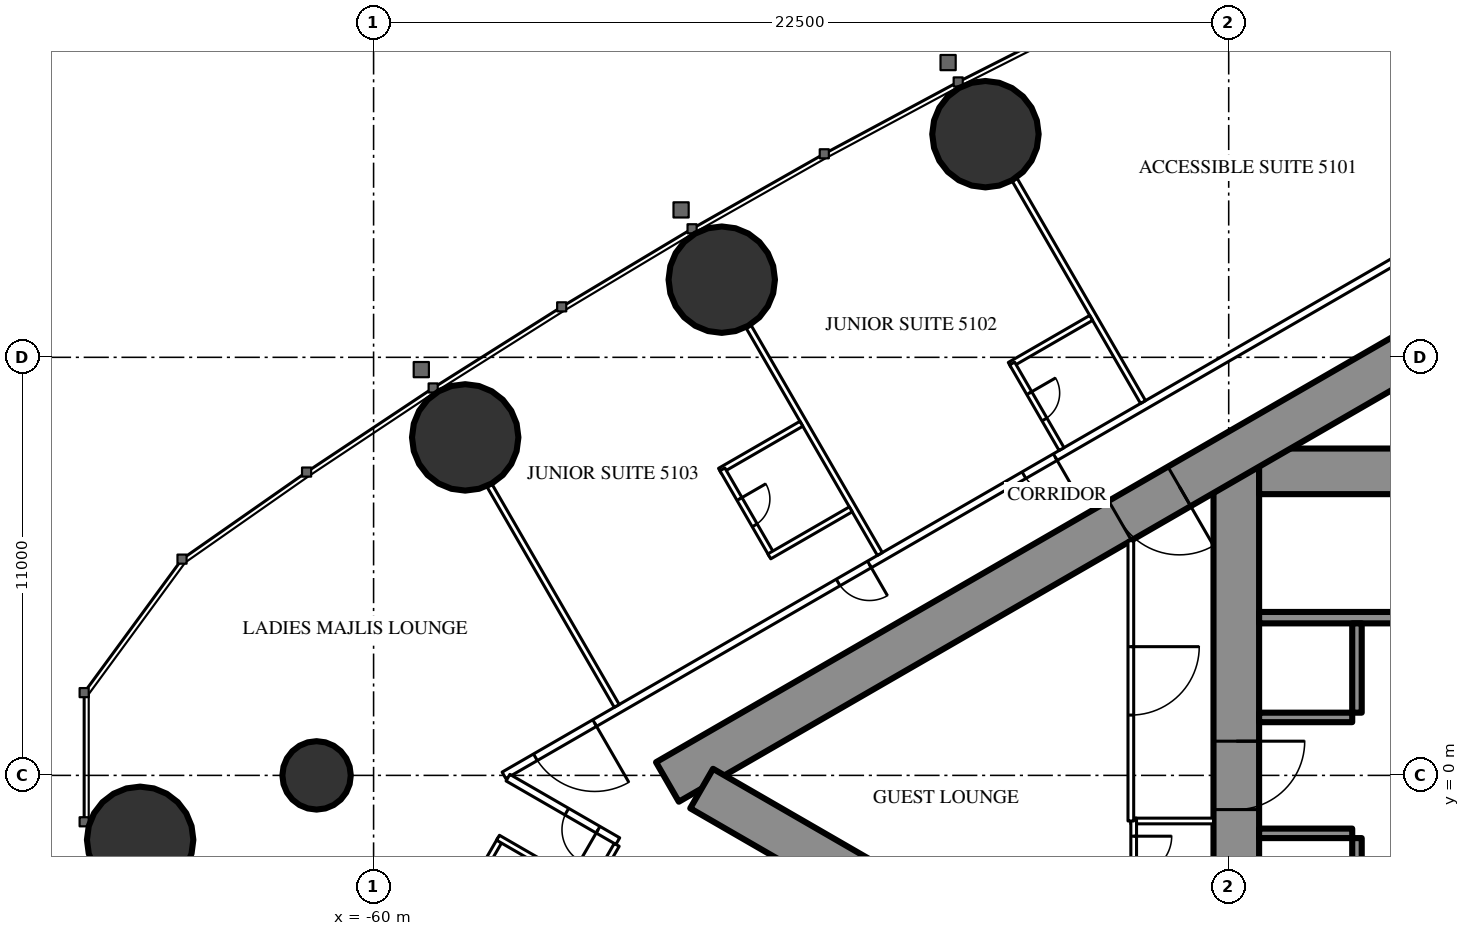
"""IFC4 building model, lengths in metres.
Left out: names, types, materials, properties, quantities, classifications, styles, units other than length and angle.
Written with IfcOpenShell. Run it as: python <this file> out.ifc"""

import sys

from ifc_helpers import new_model, si_unit, direction, frame, frame_2d, origin, origin_2d, place, context, subcontext, project, spatial, rectangle, circle, extrude, element, fill, save


model = new_model("IFC4")
c1 = context("Model", 3, precision=1e-05, world=origin(), true_north=direction((0.0, 1.0)))
c2 = subcontext(c1, "Body", "Model", "MODEL_VIEW")
j1 = project(units=[si_unit("LENGTHUNIT", "METRE"), si_unit("PLANEANGLEUNIT", "RADIAN")], contexts=[c1])
p1 = place(None, origin())
s1 = spatial("IfcSite", under=j1, at=p1, CompositionType="ELEMENT")
p2 = place(p1, origin())
s2 = spatial("IfcBuilding", under=s1, at=p2, CompositionType="ELEMENT")
p3 = place(p2, frame((0.0, 0.0, 191.3)))
s3 = spatial("IfcBuildingStorey", under=s2, at=p3, CompositionType="ELEMENT", Elevation=191.3)
for number, where, z_axis, x_axis in (
    (1, (-66.143, -1.695, 0.0), (0.0, 0.0, 1.0), (1.0, 0.0, 0.0)),
    (2, (-43.9, 16.871, 0.0), (0.0, 0.0, 1.0), (1.0, 0.0, 0.0)),
    (3, (-50.839, 13.043, 0.0), (0.0, 0.0, 1.0), (1.0, 0.0, 0.0)),
    (4, (-57.59, 8.893, 0.0), (0.0, 0.0, 1.0), (1.0, 0.0, 0.0)),
):
    element("IfcColumn", number, at=place(p3, frame(where, z_axis=z_axis, x_axis=x_axis)), inside=s3, PredefinedType="COLUMN", context=c2, shape_type="SweptSolid", body=[
        extrude(circle(Radius=1.4, at=origin_2d()), origin(), (0.0, 0.0, 1.0), 3.5),
    ])
p4 = place(p3, frame((-61.5, 0.0, 0.0), z_axis=(0.0, 0.0, 1.0), x_axis=(1.0, 0.0, 0.0)))
e5 = element("IfcColumn", 5, at=p4, inside=s3, PredefinedType="COLUMN", context=c2, shape_type="SweptSolid", body=[
    extrude(circle(Radius=0.9, at=origin_2d()), origin(), (0.0, 0.0, 1.0), 3.5),
])
p5 = place(p3, frame((-37.3, 8.6, 0.0), z_axis=(0.0, 0.0, 1.0), x_axis=(0.0, -1.0, 0.0)))
e6 = element("IfcWall", 6, at=p5, inside=s3, PredefinedType="SHEAR", context=c2, shape_type="SweptSolid", body=[
    extrude(rectangle(XDim=17.2, YDim=1.2, at=frame_2d((8.6, 0.0))), origin(), (0.0, 0.0, 1.0), 3.5),
])
p6 = place(p5, frame((7.7, 0.0, 0.0)))
e7 = element("IfcOpeningElement", 7, at=p6, cuts=e6, PredefinedType="OPENING", context=c2, shape_type="SweptSolid", body=[
    extrude(rectangle(XDim=1.8, YDim=2.2, at=frame_2d((0.9, 1.1))), frame((0.0, 0.61, 0.0), z_axis=(0.0, -1.0, 0.0), x_axis=(1.0, 0.0, 0.0)), (0.0, 0.0, 1.0), 1.22),
])
p7 = place(p3, frame((-28.3, 8.0, 0.0), z_axis=(0.0, 0.0, 1.0), x_axis=(-1.0, 0.0, 0.0)))
e8 = element("IfcWall", 8, at=p7, inside=s3, PredefinedType="SHEAR", context=c2, shape_type="SweptSolid", body=[
    extrude(rectangle(XDim=8.4, YDim=1.2, at=frame_2d((4.2, 0.0))), origin(), (0.0, 0.0, 1.0), 3.5),
])
p8 = place(p7, frame((0.25, 0.0, 0.0)))
e9 = element("IfcOpeningElement", 9, at=p8, cuts=e8, PredefinedType="OPENING", context=c2, shape_type="SweptSolid", body=[
    extrude(rectangle(XDim=1.0, YDim=2.2, at=frame_2d((0.5, 1.1))), frame((0.0, 0.61, 0.0), z_axis=(0.0, -1.0, 0.0), x_axis=(1.0, 0.0, 0.0)), (0.0, 0.0, 1.0), 1.22),
])
p9 = place(p3, frame((-28.3, 4.15, 0.0), z_axis=(0.0, 0.0, 1.0), x_axis=(-1.0, 0.0, 0.0)))
e10 = element("IfcWall", 10, at=p9, inside=s3, PredefinedType="SHEAR", context=c2, shape_type="SweptSolid", body=[
    extrude(rectangle(XDim=8.4, YDim=0.3, at=frame_2d((4.2, 0.0))), origin(), (0.0, 0.0, 1.0), 3.5),
])
p10 = place(p3, frame((-34.125, 4.0, 0.0), z_axis=(0.0, 0.0, 1.0), x_axis=(0.0, -1.0, 0.0)))
e11 = element("IfcWall", 11, at=p10, inside=s3, PredefinedType="SHEAR", context=c2, shape_type="SweptSolid", body=[
    extrude(rectangle(XDim=2.35, YDim=0.25, at=frame_2d((1.175, 0.0))), origin(), (0.0, 0.0, 1.0), 3.5),
])
p11 = place(p3, frame((-34.25, 1.525, 0.0), z_axis=(0.0, 0.0, 1.0), x_axis=(-1.0, 0.0, 0.0)))
e12 = element("IfcWall", 12, at=p11, inside=s3, PredefinedType="SHEAR", context=c2, shape_type="SweptSolid", body=[
    extrude(rectangle(XDim=2.45, YDim=0.25, at=frame_2d((1.225, 0.0))), origin(), (0.0, 0.0, 1.0), 3.5),
])
p12 = place(p3, frame((-34.125, -1.65, 0.0), z_axis=(0.0, 0.0, 1.0), x_axis=(0.0, -1.0, 0.0)))
e13 = element("IfcWall", 13, at=p12, inside=s3, PredefinedType="SHEAR", context=c2, shape_type="SweptSolid", body=[
    extrude(rectangle(XDim=2.35, YDim=0.25, at=frame_2d((1.175, 0.0))), origin(), (0.0, 0.0, 1.0), 3.5),
])
p13 = place(p3, frame((-34.25, -1.525, 0.0), z_axis=(0.0, 0.0, 1.0), x_axis=(-1.0, 0.0, 0.0)))
e14 = element("IfcWall", 14, at=p13, inside=s3, PredefinedType="SHEAR", context=c2, shape_type="SweptSolid", body=[
    extrude(rectangle(XDim=2.45, YDim=0.25, at=frame_2d((1.225, 0.0))), origin(), (0.0, 0.0, 1.0), 3.5),
])
p14 = place(p3, frame((-27.2, 14.3, 0.0), z_axis=(0.0, 0.0, 1.0), x_axis=(-0.866026593062, -0.499997940104, 0.0)))
e15 = element("IfcWall", 15, at=p14, inside=s3, PredefinedType="SHEAR", context=c2, shape_type="SweptSolid", body=[
    extrude(rectangle(XDim=28.946, YDim=1.2, at=frame_2d((14.473, 0.0))), origin(), (0.0, 0.0, 1.0), 3.5),
])
p15 = place(p14, frame((4.6, 0.0, 0.0)))
e16 = element("IfcOpeningElement", 16, at=p15, cuts=e15, PredefinedType="OPENING", context=c2, shape_type="SweptSolid", body=[
    extrude(rectangle(XDim=1.0, YDim=2.2, at=frame_2d((0.5, 1.1))), frame((0.0, 0.61, 0.0), z_axis=(0.0, -1.0, 0.0), x_axis=(1.0, 0.0, 0.0)), (0.0, 0.0, 1.0), 1.22),
])
p16 = place(p14, frame((13.395, 0.0, 0.0)))
e17 = element("IfcOpeningElement", 17, at=p16, cuts=e15, PredefinedType="OPENING", context=c2, shape_type="SweptSolid", body=[
    extrude(rectangle(XDim=1.8, YDim=2.2, at=frame_2d((0.9, 1.1))), frame((0.0, 0.61, 0.0), z_axis=(0.0, -1.0, 0.0), x_axis=(1.0, 0.0, 0.0)), (0.0, 0.0, 1.0), 1.22),
])
p17 = place(p3, frame((-27.2, -14.3, 0.0), z_axis=(0.0, 0.0, 1.0), x_axis=(-0.866024021859, 0.500002393557, 0.0)))
e18 = element("IfcWall", 18, at=p17, inside=s3, PredefinedType="SHEAR", context=c2, shape_type="SweptSolid", body=[
    extrude(rectangle(XDim=27.907, YDim=1.2, at=frame_2d((13.954, 0.0))), origin(), (0.0, 0.0, 1.0), 3.5),
])
p18 = place(p17, frame((4.6, 0.0, 0.0)))
e19 = element("IfcOpeningElement", 19, at=p18, cuts=e18, PredefinedType="OPENING", context=c2, shape_type="SweptSolid", body=[
    extrude(rectangle(XDim=1.0, YDim=2.2, at=frame_2d((0.5, 1.1))), frame((0.0, 0.61, 0.0), z_axis=(0.0, -1.0, 0.0), x_axis=(1.0, 0.0, 0.0)), (0.0, 0.0, 1.0), 1.22),
])
p19 = place(p17, frame((13.395, 0.0, 0.0)))
e20 = element("IfcOpeningElement", 20, at=p19, cuts=e18, PredefinedType="OPENING", context=c2, shape_type="SweptSolid", body=[
    extrude(rectangle(XDim=1.8, YDim=2.2, at=frame_2d((0.9, 1.1))), frame((0.0, 0.61, 0.0), z_axis=(0.0, -1.0, 0.0), x_axis=(1.0, 0.0, 0.0)), (0.0, 0.0, 1.0), 1.22),
])
p20 = place(p3, frame((-27.86, 16.575, 0.0), z_axis=(0.0, 0.0, 1.0), x_axis=(-0.866025533911, -0.499999774615, 0.0)))
e21 = element("IfcWall", 21, at=p20, inside=s3, PredefinedType="PARTITIONING", context=c2, shape_type="SweptSolid", body=[
    extrude(rectangle(XDim=33.149, YDim=0.2, at=frame_2d((16.575, 0.0))), origin(), (0.0, 0.0, 1.0), 3.25),
])
p21 = place(p20, frame((3.75, 0.0, 0.0)))
e22 = element("IfcOpeningElement", 22, at=p21, cuts=e21, PredefinedType="OPENING", context=c2, shape_type="SweptSolid", body=[
    extrude(rectangle(XDim=1.0, YDim=2.2, at=frame_2d((0.5, 1.1))), frame((0.0, 0.11, 0.0), z_axis=(0.0, -1.0, 0.0), x_axis=(1.0, 0.0, 0.0)), (0.0, 0.0, 1.0), 0.22),
])
p22 = place(p20, frame((16.402, 0.0, 0.0)))
e23 = element("IfcOpeningElement", 23, at=p22, cuts=e21, PredefinedType="OPENING", context=c2, shape_type="SweptSolid", body=[
    extrude(rectangle(XDim=0.95, YDim=2.2, at=frame_2d((0.475, 1.1))), frame((0.0, 0.11, 0.0), z_axis=(0.0, -1.0, 0.0), x_axis=(1.0, 0.0, 0.0)), (0.0, 0.0, 1.0), 0.22),
])
p23 = place(p20, frame((22.047, 0.0, 0.0)))
e24 = element("IfcOpeningElement", 24, at=p23, cuts=e21, PredefinedType="OPENING", context=c2, shape_type="SweptSolid", body=[
    extrude(rectangle(XDim=0.95, YDim=2.2, at=frame_2d((0.475, 1.1))), frame((0.0, 0.11, 0.0), z_axis=(0.0, -1.0, 0.0), x_axis=(1.0, 0.0, 0.0)), (0.0, 0.0, 1.0), 0.22),
])
p24 = place(p20, frame((30.396, 0.0, 0.0)))
e25 = element("IfcOpeningElement", 25, at=p24, cuts=e21, PredefinedType="OPENING", context=c2, shape_type="SweptSolid", body=[
    extrude(rectangle(XDim=1.8, YDim=2.2, at=frame_2d((0.9, 1.1))), frame((0.0, 0.11, 0.0), z_axis=(0.0, -1.0, 0.0), x_axis=(1.0, 0.0, 0.0)), (0.0, 0.0, 1.0), 0.22),
])
p25 = place(p3, frame((-39.754, 9.823, 0.0), z_axis=(0.0, 0.0, 1.0), x_axis=(-0.499997670926, 0.866026748472, 0.0)))
e26 = element("IfcWall", 26, at=p25, inside=s3, PredefinedType="PARTITIONING", context=c2, shape_type="SweptSolid", body=[
    extrude(rectangle(XDim=6.757, YDim=0.15, at=frame_2d((3.379, 0.0))), origin(), (0.0, 0.0, 1.0), 2.3),
])
p26 = place(p3, frame((-46.679, 5.825, 0.0), z_axis=(0.0, 0.0, 1.0), x_axis=(-0.500006839597, 0.866021454905, 0.0)))
e27 = element("IfcWall", 27, at=p26, inside=s3, PredefinedType="PARTITIONING", context=c2, shape_type="SweptSolid", body=[
    extrude(rectangle(XDim=6.911, YDim=0.15, at=frame_2d((3.456, 0.0))), origin(), (0.0, 0.0, 1.0), 2.3),
])
for number, where, z_axis, x_axis in (
    (28, (-53.602, 1.828, 0.0), (0.0, 0.0, 1.0), (-0.5, 0.866, 0.0)),
    (29, (-53.602, -1.828, 0.0), (0.0, 0.0, 1.0), (-0.5, -0.866, 0.0)),
):
    element("IfcWall", number, at=place(p3, frame(where, z_axis=z_axis, x_axis=x_axis)), inside=s3, PredefinedType="PARTITIONING", context=c2, shape_type="SweptSolid", body=[
        extrude(rectangle(XDim=6.692, YDim=0.15, at=frame_2d((3.346, 0.0))), origin(), (0.0, 0.0, 1.0), 2.3),
    ])
p27 = place(p3, frame((-53.574, -1.729, 0.0), z_axis=(0.0, 0.0, 1.0), x_axis=(-0.866019930389, 0.500009480079, 0.0)))
e30 = element("IfcWall", 30, at=p27, inside=s3, PredefinedType="PARTITIONING", context=c2, shape_type="SweptSolid", body=[
    extrude(rectangle(XDim=3.338, YDim=0.2, at=frame_2d((1.669, 0.0))), origin(), (0.0, 0.0, 1.0), 3.25),
])
p28 = place(p27, frame((0.6, 0.0, 0.0)))
e31 = element("IfcOpeningElement", 31, at=p28, cuts=e30, PredefinedType="OPENING", context=c2, shape_type="SweptSolid", body=[
    extrude(rectangle(XDim=0.95, YDim=2.2, at=frame_2d((0.475, 1.1))), frame((0.0, 0.11, 0.0), z_axis=(0.0, -1.0, 0.0), x_axis=(1.0, 0.0, 0.0)), (0.0, 0.0, 1.0), 0.22),
])
p29 = place(p3, frame((-41.119, 12.037, 0.0), z_axis=(0.0, 0.0, 1.0), x_axis=(-0.866073894602, -0.499916002032, 0.0)))
e32 = element("IfcWall", 32, at=p29, inside=s3, PredefinedType="PARTITIONING", context=c2, shape_type="SweptSolid", body=[
    extrude(rectangle(XDim=2.475, YDim=0.15, at=frame_2d((1.238, 0.0))), origin(), (0.0, 0.0, 1.0), 3.25),
])
p30 = place(p3, frame((-41.898, 8.585, 0.0), z_axis=(0.0, 0.0, 1.0), x_axis=(-0.500006934395, 0.866021400173, 0.0)))
e33 = element("IfcWall", 33, at=p30, inside=s3, PredefinedType="PARTITIONING", context=c2, shape_type="SweptSolid", body=[
    extrude(rectangle(XDim=2.6, YDim=0.15, at=frame_2d((1.3, 0.0))), origin(), (0.0, 0.0, 1.0), 3.25),
])
p31 = place(p30, frame((0.9, 0.0, 0.0)))
e34 = element("IfcOpeningElement", 34, at=p31, cuts=e33, PredefinedType="OPENING", context=c2, shape_type="SweptSolid", body=[
    extrude(rectangle(XDim=0.8, YDim=2.2, at=frame_2d((0.4, 1.1))), frame((0.0, 0.085, 0.0), z_axis=(0.0, -1.0, 0.0), x_axis=(1.0, 0.0, 0.0)), (0.0, 0.0, 1.0), 0.17),
])
p32 = place(p3, frame((-48.744, 9.252, 0.0), z_axis=(0.0, 0.0, 1.0), x_axis=(-0.866006523861, -0.500032699561, 0.0)))
e35 = element("IfcWall", 35, at=p32, inside=s3, PredefinedType="PARTITIONING", context=c2, shape_type="SweptSolid", body=[
    extrude(rectangle(XDim=2.475, YDim=0.15, at=frame_2d((1.237, 0.0))), origin(), (0.0, 0.0, 1.0), 3.25),
])
p33 = place(p3, frame((-49.522, 5.8, 0.0), z_axis=(0.0, 0.0, 1.0), x_axis=(-0.500006934395, 0.866021400173, 0.0)))
e36 = element("IfcWall", 36, at=p33, inside=s3, PredefinedType="PARTITIONING", context=c2, shape_type="SweptSolid", body=[
    extrude(rectangle(XDim=2.6, YDim=0.15, at=frame_2d((1.3, 0.0))), origin(), (0.0, 0.0, 1.0), 3.25),
])
p34 = place(p33, frame((0.9, 0.0, 0.0)))
e37 = element("IfcOpeningElement", 37, at=p34, cuts=e36, PredefinedType="OPENING", context=c2, shape_type="SweptSolid", body=[
    extrude(rectangle(XDim=0.8, YDim=2.2, at=frame_2d((0.4, 1.1))), frame((0.0, 0.085, 0.0), z_axis=(0.0, -1.0, 0.0), x_axis=(1.0, 0.0, 0.0)), (0.0, 0.0, 1.0), 0.17),
])
p35 = place(p3, frame((-47.444, 7.0, 0.0), z_axis=(0.0, 0.0, 1.0), x_axis=(-0.866006523861, -0.500032699561, 0.0)))
e38 = element("IfcWall", 38, at=p35, inside=s3, PredefinedType="PARTITIONING", context=c2, shape_type="SweptSolid", body=[
    extrude(rectangle(XDim=2.475, YDim=0.15, at=frame_2d((1.237, 0.0))), origin(), (0.0, 0.0, 1.0), 3.25),
])
p36 = place(p3, frame((-56.662, -1.678, 0.0), z_axis=(0.0, 0.0, 1.0), x_axis=(-0.500006934395, -0.866021400173, 0.0)))
e39 = element("IfcWall", 39, at=p36, inside=s3, PredefinedType="PARTITIONING", context=c2, shape_type="SweptSolid", body=[
    extrude(rectangle(XDim=2.6, YDim=0.15, at=frame_2d((1.3, 0.0))), origin(), (0.0, 0.0, 1.0), 3.25),
])
p37 = place(p36, frame((0.9, 0.0, 0.0)))
e40 = element("IfcOpeningElement", 40, at=p37, cuts=e39, PredefinedType="OPENING", context=c2, shape_type="SweptSolid", body=[
    extrude(rectangle(XDim=0.8, YDim=2.2, at=frame_2d((0.4, 1.1))), frame((0.0, 0.085, 0.0), z_axis=(0.0, -1.0, 0.0), x_axis=(1.0, 0.0, 0.0)), (0.0, 0.0, 1.0), 0.17),
])
p38 = place(p3, frame((-54.583, -2.878, 0.0), z_axis=(0.0, 0.0, 1.0), x_axis=(-0.866006523861, 0.500032699561, 0.0)))
e41 = element("IfcWall", 41, at=p38, inside=s3, PredefinedType="PARTITIONING", context=c2, shape_type="SweptSolid", body=[
    extrude(rectangle(XDim=2.475, YDim=0.15, at=frame_2d((1.237, 0.0))), origin(), (0.0, 0.0, 1.0), 3.25),
])
p39 = place(p3, frame((-37.9, -1.2, 0.0), z_axis=(0.0, 0.0, 1.0), x_axis=(-1.0, 0.0, 0.0)))
e42 = element("IfcWall", 42, at=p39, inside=s3, PredefinedType="PARTITIONING", context=c2, shape_type="SweptSolid", body=[
    extrude(rectangle(XDim=2.175, YDim=0.15, at=frame_2d((1.087, 0.0))), origin(), (0.0, 0.0, 1.0), 3.25),
])
p40 = place(p3, frame((-40.0, -1.125, 0.0), z_axis=(0.0, 0.0, 1.0), x_axis=(0.0, -1.0, 0.0)))
e43 = element("IfcWall", 43, at=p40, inside=s3, PredefinedType="PARTITIONING", context=c2, shape_type="SweptSolid", body=[
    extrude(rectangle(XDim=1.95, YDim=0.15, at=frame_2d((0.975, 0.0))), origin(), (0.0, 0.0, 1.0), 3.25),
])
p41 = place(p40, frame((0.475, 0.0, 0.0)))
e44 = element("IfcOpeningElement", 44, at=p41, cuts=e43, PredefinedType="OPENING", context=c2, shape_type="SweptSolid", body=[
    extrude(rectangle(XDim=1.0, YDim=2.2, at=frame_2d((0.5, 1.1))), frame((0.0, 0.085, 0.0), z_axis=(0.0, -1.0, 0.0), x_axis=(1.0, 0.0, 0.0)), (0.0, 0.0, 1.0), 0.17),
])
p42 = place(p3, frame((-40.075, 6.174, 0.0), z_axis=(0.0, 0.0, 1.0), x_axis=(0.0, -1.0, 0.0)))
e45 = element("IfcWall", 45, at=p42, inside=s3, PredefinedType="PARTITIONING", context=c2, shape_type="SweptSolid", body=[
    extrude(rectangle(XDim=7.374, YDim=0.15, at=frame_2d((3.687, 0.0))), origin(), (0.0, 0.0, 1.0), 3.25),
])
p43 = place(p42, frame((2.787, 0.0, 0.0)))
e46 = element("IfcOpeningElement", 46, at=p43, cuts=e45, PredefinedType="OPENING", context=c2, shape_type="SweptSolid", body=[
    extrude(rectangle(XDim=1.8, YDim=2.2, at=frame_2d((0.9, 1.1))), frame((0.0, 0.085, 0.0), z_axis=(0.0, -1.0, 0.0), x_axis=(1.0, 0.0, 0.0)), (0.0, 0.0, 1.0), 0.17),
])
p44 = place(p31, origin())
e47 = element("IfcDoor", 47, at=p44, inside=s3, OperationType="SINGLE_SWING_RIGHT", PredefinedType="DOOR", context=c2, shape_type="SweptSolid", body=[
    extrude(rectangle(XDim=0.8, YDim=2.2, at=frame_2d((0.4, 1.1))), frame((0.0, 0.025, 0.0), z_axis=(0.0, -1.0, 0.0), x_axis=(1.0, 0.0, 0.0)), (0.0, 0.0, 1.0), 0.05),
])
fill(e34, e47)
p45 = place(p22, origin())
e48 = element("IfcDoor", 48, at=p45, inside=s3, OperationType="SINGLE_SWING_LEFT", PredefinedType="DOOR", context=c2, shape_type="SweptSolid", body=[
    extrude(rectangle(XDim=0.95, YDim=2.2, at=frame_2d((0.475, 1.1))), frame((0.0, 0.025, 0.0), z_axis=(0.0, -1.0, 0.0), x_axis=(1.0, 0.0, 0.0)), (0.0, 0.0, 1.0), 0.05),
])
fill(e23, e48)
p46 = place(p34, origin())
e49 = element("IfcDoor", 49, at=p46, inside=s3, OperationType="SINGLE_SWING_RIGHT", PredefinedType="DOOR", context=c2, shape_type="SweptSolid", body=[
    extrude(rectangle(XDim=0.8, YDim=2.2, at=frame_2d((0.4, 1.1))), frame((0.0, 0.025, 0.0), z_axis=(0.0, -1.0, 0.0), x_axis=(1.0, 0.0, 0.0)), (0.0, 0.0, 1.0), 0.05),
])
fill(e37, e49)
p47 = place(p23, origin())
e50 = element("IfcDoor", 50, at=p47, inside=s3, OperationType="SINGLE_SWING_LEFT", PredefinedType="DOOR", context=c2, shape_type="SweptSolid", body=[
    extrude(rectangle(XDim=0.95, YDim=2.2, at=frame_2d((0.475, 1.1))), frame((0.0, 0.025, 0.0), z_axis=(0.0, -1.0, 0.0), x_axis=(1.0, 0.0, 0.0)), (0.0, 0.0, 1.0), 0.05),
])
fill(e24, e50)
p48 = place(p24, origin())
e51 = element("IfcDoor", 51, at=p48, inside=s3, OperationType="DOUBLE_DOOR_SINGLE_SWING", PredefinedType="DOOR", context=c2, shape_type="SweptSolid", body=[
    extrude(rectangle(XDim=1.8, YDim=2.2, at=frame_2d((0.9, 1.1))), frame((0.0, 0.025, 0.0), z_axis=(0.0, -1.0, 0.0), x_axis=(1.0, 0.0, 0.0)), (0.0, 0.0, 1.0), 0.05),
])
fill(e25, e51)
p49 = place(p28, origin())
e52 = element("IfcDoor", 52, at=p49, inside=s3, OperationType="SINGLE_SWING_LEFT", PredefinedType="DOOR", context=c2, shape_type="SweptSolid", body=[
    extrude(rectangle(XDim=0.95, YDim=2.2, at=frame_2d((0.475, 1.1))), frame((0.0, 0.025, 0.0), z_axis=(0.0, -1.0, 0.0), x_axis=(1.0, 0.0, 0.0)), (0.0, 0.0, 1.0), 0.05),
])
fill(e31, e52)
p50 = place(p41, origin())
e53 = element("IfcDoor", 53, at=p50, inside=s3, OperationType="SINGLE_SWING_LEFT", PredefinedType="DOOR", context=c2, shape_type="SweptSolid", body=[
    extrude(rectangle(XDim=1.0, YDim=2.2, at=frame_2d((0.5, 1.1))), frame((0.0, 0.025, 0.0), z_axis=(0.0, -1.0, 0.0), x_axis=(1.0, 0.0, 0.0)), (0.0, 0.0, 1.0), 0.05),
])
fill(e44, e53)
p51 = place(p43, origin())
e54 = element("IfcDoor", 54, at=p51, inside=s3, OperationType="DOUBLE_DOOR_SINGLE_SWING", PredefinedType="DOOR", context=c2, shape_type="SweptSolid", body=[
    extrude(rectangle(XDim=1.8, YDim=2.2, at=frame_2d((0.9, 1.1))), frame((0.0, 0.025, 0.0), z_axis=(0.0, -1.0, 0.0), x_axis=(1.0, 0.0, 0.0)), (0.0, 0.0, 1.0), 0.05),
])
fill(e46, e54)
p52 = place(p16, origin())
e55 = element("IfcDoor", 55, at=p52, inside=s3, OperationType="DOUBLE_DOOR_SINGLE_SWING", PredefinedType="DOOR", context=c2, shape_type="SweptSolid", body=[
    extrude(rectangle(XDim=1.8, YDim=2.2, at=frame_2d((0.9, 1.1))), frame((0.0, 0.025, 0.0), z_axis=(0.0, -1.0, 0.0), x_axis=(1.0, 0.0, 0.0)), (0.0, 0.0, 1.0), 0.05),
])
fill(e17, e55)
p53 = place(p6, origin())
e56 = element("IfcDoor", 56, at=p53, inside=s3, OperationType="DOUBLE_DOOR_SINGLE_SWING", PredefinedType="DOOR", context=c2, shape_type="SweptSolid", body=[
    extrude(rectangle(XDim=1.8, YDim=2.2, at=frame_2d((0.9, 1.1))), frame((0.0, 0.025, 0.0), z_axis=(0.0, -1.0, 0.0), x_axis=(1.0, 0.0, 0.0)), (0.0, 0.0, 1.0), 0.05),
])
fill(e7, e56)
save(model, sys.argv[1])
